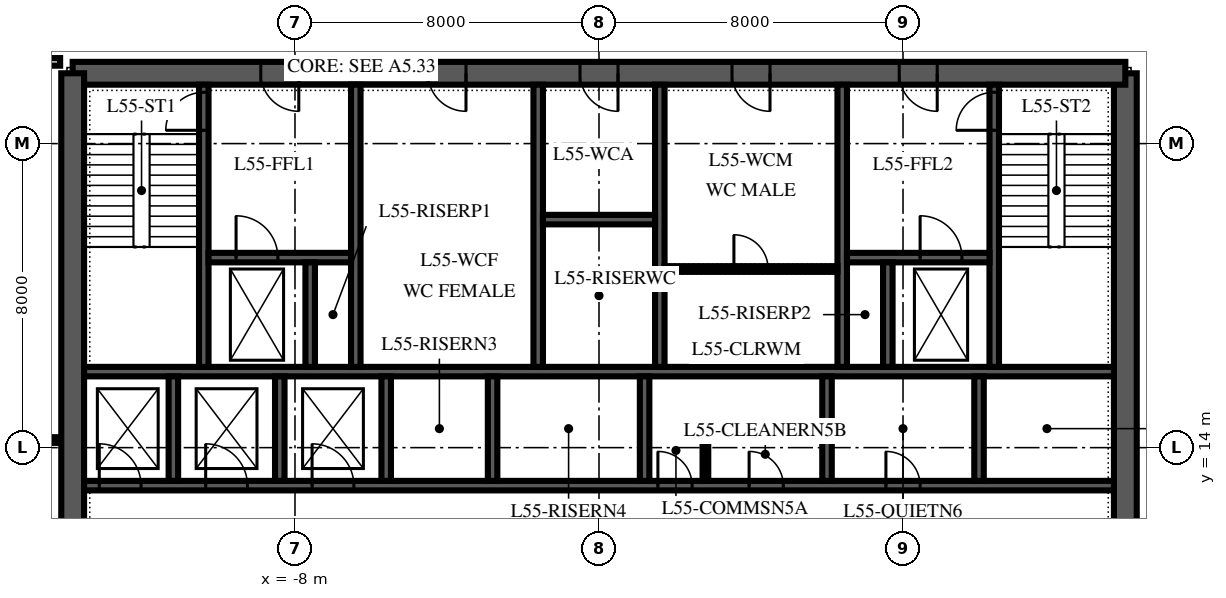
"""IFC4 building model, lengths in metres.
Left out: names, types, materials, properties, quantities, classifications, styles, units other than length and angle.
Written with IfcOpenShell. Run it as: python <this file> out.ifc"""

import sys

from ifc_helpers import new_model, si_unit, direction, frame, frame_2d, origin, place, context, subcontext, project, spatial, polyline, rectangle, outline, extrude, element, fill, save


model = new_model("IFC4")
c1 = context("Model", 3, precision=1e-05, world=origin(), true_north=direction((0.0, 1.0)))
c2 = subcontext(c1, "Body", "Model", "MODEL_VIEW")
j1 = project(units=[si_unit("LENGTHUNIT", "METRE"), si_unit("PLANEANGLEUNIT", "RADIAN")], contexts=[c1])
p1 = place(None, origin())
s1 = spatial("IfcSite", under=j1, at=p1, CompositionType="ELEMENT")
p2 = place(p1, origin())
s2 = spatial("IfcBuilding", under=s1, at=p2, CompositionType="ELEMENT")
p3 = place(p2, frame((0.0, 0.0, 238.0)))
s3 = spatial("IfcBuildingStorey", under=s2, at=p3, CompositionType="ELEMENT", Elevation=238.0)
p4 = place(p3, frame((13.85, 6.15, 0.0), z_axis=(0.0, 0.0, 1.0), x_axis=(0.0, 1.0, 0.0)))
e1 = element("IfcWall", 1, at=p4, inside=s3, PredefinedType="SHEAR", context=c2, shape_type="SweptSolid", body=[
    extrude(outline(polyline([(0.0, -0.3), (17.7, -0.3), (17.7, 0.0), (17.4, 0.0), (17.4, 0.3), (0.3, 0.3), (0.3, 0.0), (0.0, 0.0), (0.0, -0.3)])), origin(), (0.0, 0.0, 1.0), 4.0),
])
p5 = place(p4, frame((4.15, 0.0, 0.0)))
e2 = element("IfcOpeningElement", 2, at=p5, cuts=e1, PredefinedType="OPENING", context=c2, shape_type="SweptSolid", body=[
    extrude(rectangle(XDim=1.8, YDim=2.4, at=frame_2d((0.9, 1.2))), frame((0.0, 0.315, 0.0), z_axis=(0.0, -1.0, 0.0), x_axis=(1.0, 0.0, 0.0)), (0.0, 0.0, 1.0), 0.63),
])
p6 = place(p3, frame((13.85, 23.85, 0.0), z_axis=(0.0, 0.0, 1.0), x_axis=(-1.0, 0.0, 0.0)))
e3 = element("IfcWall", 3, at=p6, inside=s3, PredefinedType="SHEAR", context=c2, shape_type="SweptSolid", body=[
    extrude(rectangle(XDim=27.7, YDim=0.6, at=frame_2d((13.85, 0.0))), origin(), (0.0, 0.0, 1.0), 4.0),
])
p7 = place(p6, frame((21.75, 0.0, 0.0)))
e4 = element("IfcOpeningElement", 4, at=p7, cuts=e3, PredefinedType="OPENING", context=c2, shape_type="SweptSolid", body=[
    extrude(rectangle(XDim=1.0, YDim=2.1, at=frame_2d((0.5, 1.05))), frame((0.0, 0.315, 0.0), z_axis=(0.0, -1.0, 0.0), x_axis=(1.0, 0.0, 0.0)), (0.0, 0.0, 1.0), 0.63),
])
p8 = place(p6, frame((4.95, 0.0, 0.0)))
e5 = element("IfcOpeningElement", 5, at=p8, cuts=e3, PredefinedType="OPENING", context=c2, shape_type="SweptSolid", body=[
    extrude(rectangle(XDim=1.0, YDim=2.1, at=frame_2d((0.5, 1.05))), frame((0.0, 0.315, 0.0), z_axis=(0.0, -1.0, 0.0), x_axis=(1.0, 0.0, 0.0)), (0.0, 0.0, 1.0), 0.63),
])
p9 = place(p6, frame((17.35, 0.0, 0.0)))
e6 = element("IfcOpeningElement", 6, at=p9, cuts=e3, PredefinedType="OPENING", context=c2, shape_type="SweptSolid", body=[
    extrude(rectangle(XDim=1.0, YDim=2.1, at=frame_2d((0.5, 1.05))), frame((0.0, 0.315, 0.0), z_axis=(0.0, -1.0, 0.0), x_axis=(1.0, 0.0, 0.0)), (0.0, 0.0, 1.0), 0.63),
])
p10 = place(p6, frame((13.35, 0.0, 0.0)))
e7 = element("IfcOpeningElement", 7, at=p10, cuts=e3, PredefinedType="OPENING", context=c2, shape_type="SweptSolid", body=[
    extrude(rectangle(XDim=1.0, YDim=2.1, at=frame_2d((0.5, 1.05))), frame((0.0, 0.315, 0.0), z_axis=(0.0, -1.0, 0.0), x_axis=(1.0, 0.0, 0.0)), (0.0, 0.0, 1.0), 0.63),
])
p11 = place(p6, frame((9.35, 0.0, 0.0)))
e8 = element("IfcOpeningElement", 8, at=p11, cuts=e3, PredefinedType="OPENING", context=c2, shape_type="SweptSolid", body=[
    extrude(rectangle(XDim=1.0, YDim=2.1, at=frame_2d((0.5, 1.05))), frame((0.0, 0.315, 0.0), z_axis=(0.0, -1.0, 0.0), x_axis=(1.0, 0.0, 0.0)), (0.0, 0.0, 1.0), 0.63),
])
p12 = place(p3, frame((-13.85, 23.85, 0.0), z_axis=(0.0, 0.0, 1.0), x_axis=(0.0, -1.0, 0.0)))
e9 = element("IfcWall", 9, at=p12, inside=s3, PredefinedType="SHEAR", context=c2, shape_type="SweptSolid", body=[
    extrude(outline(polyline([(0.0, -0.3), (17.7, -0.3), (17.7, 0.0), (17.4, 0.0), (17.4, 0.3), (0.3, 0.3), (0.3, 0.0), (0.0, 0.0), (0.0, -0.3)])), origin(), (0.0, 0.0, 1.0), 4.0),
])
p13 = place(p12, frame((11.75, 0.0, 0.0)))
e10 = element("IfcOpeningElement", 10, at=p13, cuts=e9, PredefinedType="OPENING", context=c2, shape_type="SweptSolid", body=[
    extrude(rectangle(XDim=1.8, YDim=2.4, at=frame_2d((0.9, 1.2))), frame((0.0, 0.315, 0.0), z_axis=(0.0, -1.0, 0.0), x_axis=(1.0, 0.0, 0.0)), (0.0, 0.0, 1.0), 0.63),
])
p14 = place(p3, frame((-13.55, 13.0, 0.0), z_axis=(0.0, 0.0, 1.0), x_axis=(1.0, 0.0, 0.0)))
e11 = element("IfcWall", 11, at=p14, inside=s3, PredefinedType="SHEAR", context=c2, shape_type="SweptSolid", body=[
    extrude(rectangle(XDim=27.1, YDim=0.25, at=frame_2d((13.55, 0.0))), origin(), (0.0, 0.0, 1.0), 4.0),
])
p15 = place(p14, frame((0.4, 0.0, 0.0)))
e12 = element("IfcOpeningElement", 12, at=p15, cuts=e11, PredefinedType="OPENING", context=c2, shape_type="SweptSolid", body=[
    extrude(rectangle(XDim=1.1, YDim=2.1, at=frame_2d((0.55, 1.05))), frame((0.0, 0.14, 0.0), z_axis=(0.0, -1.0, 0.0), x_axis=(1.0, 0.0, 0.0)), (0.0, 0.0, 1.0), 0.28),
])
p16 = place(p14, frame((3.2, 0.0, 0.0)))
e13 = element("IfcOpeningElement", 13, at=p16, cuts=e11, PredefinedType="OPENING", context=c2, shape_type="SweptSolid", body=[
    extrude(rectangle(XDim=1.1, YDim=2.1, at=frame_2d((0.55, 1.05))), frame((0.0, 0.14, 0.0), z_axis=(0.0, -1.0, 0.0), x_axis=(1.0, 0.0, 0.0)), (0.0, 0.0, 1.0), 0.28),
])
p17 = place(p14, frame((6.0, 0.0, 0.0)))
e14 = element("IfcOpeningElement", 14, at=p17, cuts=e11, PredefinedType="OPENING", context=c2, shape_type="SweptSolid", body=[
    extrude(rectangle(XDim=1.1, YDim=2.1, at=frame_2d((0.55, 1.05))), frame((0.0, 0.14, 0.0), z_axis=(0.0, -1.0, 0.0), x_axis=(1.0, 0.0, 0.0)), (0.0, 0.0, 1.0), 0.28),
])
p18 = place(p14, frame((15.1, 0.0, 0.0)))
e15 = element("IfcOpeningElement", 15, at=p18, cuts=e11, PredefinedType="OPENING", context=c2, shape_type="SweptSolid", body=[
    extrude(rectangle(XDim=0.9, YDim=2.1, at=frame_2d((0.45, 1.05))), frame((0.0, 0.14, 0.0), z_axis=(0.0, -1.0, 0.0), x_axis=(1.0, 0.0, 0.0)), (0.0, 0.0, 1.0), 0.28),
])
p19 = place(p14, frame((17.5, 0.0, 0.0)))
e16 = element("IfcOpeningElement", 16, at=p19, cuts=e11, PredefinedType="OPENING", context=c2, shape_type="SweptSolid", body=[
    extrude(rectangle(XDim=0.9, YDim=2.1, at=frame_2d((0.45, 1.05))), frame((0.0, 0.14, 0.0), z_axis=(0.0, -1.0, 0.0), x_axis=(1.0, 0.0, 0.0)), (0.0, 0.0, 1.0), 0.28),
])
p20 = place(p14, frame((21.1, 0.0, 0.0)))
e17 = element("IfcOpeningElement", 17, at=p20, cuts=e11, PredefinedType="OPENING", context=c2, shape_type="SweptSolid", body=[
    extrude(rectangle(XDim=0.9, YDim=2.1, at=frame_2d((0.45, 1.05))), frame((0.0, 0.14, 0.0), z_axis=(0.0, -1.0, 0.0), x_axis=(1.0, 0.0, 0.0)), (0.0, 0.0, 1.0), 0.28),
])
p21 = place(p3, frame((-13.55, 16.0, 0.0), z_axis=(0.0, 0.0, 1.0), x_axis=(1.0, 0.0, 0.0)))
e18 = element("IfcWall", 18, at=p21, inside=s3, PredefinedType="SHEAR", context=c2, shape_type="SweptSolid", body=[
    extrude(rectangle(XDim=27.1, YDim=0.25, at=frame_2d((13.55, 0.0))), origin(), (0.0, 0.0, 1.0), 4.0),
])
for number, where, z_axis, x_axis in (
    (19, (-11.2, 13.125, 0.0), (0.0, 0.0, 1.0), (0.0, 1.0, 0.0)),
    (20, (-8.4, 13.125, 0.0), (0.0, 0.0, 1.0), (0.0, 1.0, 0.0)),
    (21, (-5.6, 13.125, 0.0), (0.0, 0.0, 1.0), (0.0, 1.0, 0.0)),
    (22, (-2.8, 13.125, 0.0), (0.0, 0.0, 1.0), (0.0, 1.0, 0.0)),
    (23, (1.2, 13.125, 0.0), (0.0, 0.0, 1.0), (0.0, 1.0, 0.0)),
    (24, (6.0, 13.125, 0.0), (0.0, 0.0, 1.0), (0.0, 1.0, 0.0)),
    (25, (10.0, 13.125, 0.0), (0.0, 0.0, 1.0), (0.0, 1.0, 0.0)),
):
    element("IfcWall", number, at=place(p3, frame(where, z_axis=z_axis, x_axis=x_axis)), inside=s3, PredefinedType="SHEAR", context=c2, shape_type="SweptSolid", body=[
        extrude(rectangle(XDim=2.75, YDim=0.25, at=frame_2d((1.375, 0.0))), origin(), (0.0, 0.0, 1.0), 4.0),
    ])
p22 = place(p3, frame((-10.4, 16.125, 0.0), z_axis=(0.0, 0.0, 1.0), x_axis=(0.0, 1.0, 0.0)))
e26 = element("IfcWall", 26, at=p22, inside=s3, PredefinedType="SHEAR", context=c2, shape_type="SweptSolid", body=[
    extrude(rectangle(XDim=7.425, YDim=0.25, at=frame_2d((3.712, 0.0))), origin(), (0.0, 0.0, 1.0), 4.0),
])
p23 = place(p22, frame((6.225, 0.0, 0.0)))
e27 = element("IfcOpeningElement", 27, at=p23, cuts=e26, PredefinedType="OPENING", context=c2, shape_type="SweptSolid", body=[
    extrude(rectangle(XDim=1.0, YDim=2.1, at=frame_2d((0.5, 1.05))), frame((0.0, 0.14, 0.0), z_axis=(0.0, -1.0, 0.0), x_axis=(1.0, 0.0, 0.0)), (0.0, 0.0, 1.0), 0.28),
])
for number, where, z_axis, x_axis in (
    (28, (-6.4, 16.125, 0.0), (0.0, 0.0, 1.0), (0.0, 1.0, 0.0)),
    (29, (-1.6, 16.125, 0.0), (0.0, 0.0, 1.0), (0.0, 1.0, 0.0)),
    (30, (1.6, 16.125, 0.0), (0.0, 0.0, 1.0), (0.0, 1.0, 0.0)),
    (31, (6.4, 16.125, 0.0), (0.0, 0.0, 1.0), (0.0, 1.0, 0.0)),
):
    element("IfcWall", number, at=place(p3, frame(where, z_axis=z_axis, x_axis=x_axis)), inside=s3, PredefinedType="SHEAR", context=c2, shape_type="SweptSolid", body=[
        extrude(rectangle(XDim=7.425, YDim=0.25, at=frame_2d((3.712, 0.0))), origin(), (0.0, 0.0, 1.0), 4.0),
    ])
p24 = place(p3, frame((10.4, 16.125, 0.0), z_axis=(0.0, 0.0, 1.0), x_axis=(0.0, 1.0, 0.0)))
e32 = element("IfcWall", 32, at=p24, inside=s3, PredefinedType="SHEAR", context=c2, shape_type="SweptSolid", body=[
    extrude(rectangle(XDim=7.425, YDim=0.25, at=frame_2d((3.712, 0.0))), origin(), (0.0, 0.0, 1.0), 4.0),
])
p25 = place(p24, frame((6.225, 0.0, 0.0)))
e33 = element("IfcOpeningElement", 33, at=p25, cuts=e32, PredefinedType="OPENING", context=c2, shape_type="SweptSolid", body=[
    extrude(rectangle(XDim=1.0, YDim=2.1, at=frame_2d((0.5, 1.05))), frame((0.0, 0.14, 0.0), z_axis=(0.0, -1.0, 0.0), x_axis=(1.0, 0.0, 0.0)), (0.0, 0.0, 1.0), 0.28),
])
p26 = place(p3, frame((-10.275, 19.0, 0.0), z_axis=(0.0, 0.0, 1.0), x_axis=(1.0, 0.0, 0.0)))
e34 = element("IfcWall", 34, at=p26, inside=s3, PredefinedType="SHEAR", context=c2, shape_type="SweptSolid", body=[
    extrude(rectangle(XDim=3.75, YDim=0.25, at=frame_2d((1.875, 0.0))), origin(), (0.0, 0.0, 1.0), 4.0),
])
p27 = place(p26, frame((0.725, 0.0, 0.0)))
e35 = element("IfcOpeningElement", 35, at=p27, cuts=e34, PredefinedType="OPENING", context=c2, shape_type="SweptSolid", body=[
    extrude(rectangle(XDim=1.1, YDim=2.1, at=frame_2d((0.55, 1.05))), frame((0.0, 0.14, 0.0), z_axis=(0.0, -1.0, 0.0), x_axis=(1.0, 0.0, 0.0)), (0.0, 0.0, 1.0), 0.28),
])
p28 = place(p3, frame((6.525, 19.0, 0.0), z_axis=(0.0, 0.0, 1.0), x_axis=(1.0, 0.0, 0.0)))
e36 = element("IfcWall", 36, at=p28, inside=s3, PredefinedType="SHEAR", context=c2, shape_type="SweptSolid", body=[
    extrude(rectangle(XDim=3.75, YDim=0.25, at=frame_2d((1.875, 0.0))), origin(), (0.0, 0.0, 1.0), 4.0),
])
p29 = place(p28, frame((1.925, 0.0, 0.0)))
e37 = element("IfcOpeningElement", 37, at=p29, cuts=e36, PredefinedType="OPENING", context=c2, shape_type="SweptSolid", body=[
    extrude(rectangle(XDim=1.1, YDim=2.1, at=frame_2d((0.55, 1.05))), frame((0.0, 0.14, 0.0), z_axis=(0.0, -1.0, 0.0), x_axis=(1.0, 0.0, 0.0)), (0.0, 0.0, 1.0), 0.28),
])
for number, where, z_axis, x_axis in (
    (38, (-7.6, 16.125, 0.0), (0.0, 0.0, 1.0), (0.0, 1.0, 0.0)),
    (39, (7.6, 16.125, 0.0), (0.0, 0.0, 1.0), (0.0, 1.0, 0.0)),
):
    element("IfcWall", number, at=place(p3, frame(where, z_axis=z_axis, x_axis=x_axis)), inside=s3, PredefinedType="SHEAR", context=c2, shape_type="SweptSolid", body=[
        extrude(rectangle(XDim=2.75, YDim=0.25, at=frame_2d((1.375, 0.0))), origin(), (0.0, 0.0, 1.0), 4.0),
    ])
p30 = place(p3, frame((-1.475, 20.0, 0.0), z_axis=(0.0, 0.0, 1.0), x_axis=(1.0, 0.0, 0.0)))
e40 = element("IfcWall", 40, at=p30, inside=s3, PredefinedType="SHEAR", context=c2, shape_type="SweptSolid", body=[
    extrude(rectangle(XDim=2.95, YDim=0.25, at=frame_2d((1.475, 0.0))), origin(), (0.0, 0.0, 1.0), 4.0),
])
p31 = place(p3, frame((1.725, 18.7, 0.0), z_axis=(0.0, 0.0, 1.0), x_axis=(1.0, 0.0, 0.0)))
e41 = element("IfcWall", 41, at=p31, inside=s3, PredefinedType="PARTITIONING", context=c2, shape_type="SweptSolid", body=[
    extrude(rectangle(XDim=4.55, YDim=0.15, at=frame_2d((2.275, 0.0))), origin(), (0.0, 0.0, 1.0), 3.85),
])
p32 = place(p31, frame((1.825, 0.0, 0.0)))
e42 = element("IfcOpeningElement", 42, at=p32, cuts=e41, PredefinedType="OPENING", context=c2, shape_type="SweptSolid", body=[
    extrude(rectangle(XDim=0.9, YDim=2.1, at=frame_2d((0.45, 1.05))), frame((0.0, 0.09, 0.0), z_axis=(0.0, -1.0, 0.0), x_axis=(1.0, 0.0, 0.0)), (0.0, 0.0, 1.0), 0.18),
])
p33 = place(p3, frame((2.8, 13.125, 0.0), z_axis=(0.0, 0.0, 1.0), x_axis=(0.0, 1.0, 0.0)))
e43 = element("IfcWall", 43, at=p33, inside=s3, PredefinedType="PARTITIONING", context=c2, shape_type="SweptSolid", body=[
    extrude(rectangle(XDim=1.55, YDim=0.15, at=frame_2d((0.775, 0.0))), origin(), (0.0, 0.0, 1.0), 3.85),
])
p34 = place(p3, frame((2.875, 14.6, 0.0), z_axis=(0.0, 0.0, 1.0), x_axis=(1.0, 0.0, 0.0)))
e44 = element("IfcWall", 44, at=p34, inside=s3, PredefinedType="PARTITIONING", context=c2, shape_type="SweptSolid", body=[
    extrude(rectangle(XDim=3.0, YDim=0.15, at=frame_2d((1.5, 0.0))), origin(), (0.0, 0.0, 1.0), 3.85),
])
p35 = place(p3, frame((-20.075, 14.2, 0.0), z_axis=(0.0, 0.0, 1.0), x_axis=(1.0, 0.0, 0.0)))
e45 = element("IfcWall", 45, at=p35, inside=s3, PredefinedType="PARTITIONING", context=c2, shape_type="SweptSolid", body=[
    extrude(rectangle(XDim=5.895, YDim=0.15, at=frame_2d((2.948, 0.0))), origin(), (0.0, 0.0, 1.0), 3.13),
])
p36 = place(p3, frame((-16.1, 24.15, 0.0), z_axis=(0.0, 0.0, 1.0), x_axis=(1.0, 0.0, 0.0)))
e46 = element("IfcWall", 46, at=p36, inside=s3, PredefinedType="PARTITIONING", context=c2, shape_type="SweptSolid", body=[
    extrude(rectangle(XDim=1.92, YDim=0.2, at=frame_2d((0.96, 0.0))), origin(), (0.0, 0.0, 1.0), 3.318),
])
p37 = place(p7, origin())
e47 = element("IfcDoor", 47, at=p37, inside=s3, OperationType="SINGLE_SWING_RIGHT", PredefinedType="DOOR", context=c2, shape_type="SweptSolid", body=[
    extrude(rectangle(XDim=1.0, YDim=2.1, at=frame_2d((0.5, 1.05))), frame((0.0, 0.3, 0.0), z_axis=(0.0, -1.0, 0.0), x_axis=(1.0, 0.0, 0.0)), (0.0, 0.0, 1.0), 0.6),
])
fill(e4, e47)
p38 = place(p8, origin())
e48 = element("IfcDoor", 48, at=p38, inside=s3, OperationType="SINGLE_SWING_RIGHT", PredefinedType="DOOR", context=c2, shape_type="SweptSolid", body=[
    extrude(rectangle(XDim=1.0, YDim=2.1, at=frame_2d((0.5, 1.05))), frame((0.0, 0.3, 0.0), z_axis=(0.0, -1.0, 0.0), x_axis=(1.0, 0.0, 0.0)), (0.0, 0.0, 1.0), 0.6),
])
fill(e5, e48)
p39 = place(p9, origin())
e49 = element("IfcDoor", 49, at=p39, inside=s3, OperationType="SINGLE_SWING_LEFT", PredefinedType="DOOR", context=c2, shape_type="SweptSolid", body=[
    extrude(rectangle(XDim=1.0, YDim=2.1, at=frame_2d((0.5, 1.05))), frame((0.0, 0.3, 0.0), z_axis=(0.0, -1.0, 0.0), x_axis=(1.0, 0.0, 0.0)), (0.0, 0.0, 1.0), 0.6),
])
fill(e6, e49)
p40 = place(p10, origin())
e50 = element("IfcDoor", 50, at=p40, inside=s3, OperationType="SINGLE_SWING_LEFT", PredefinedType="DOOR", context=c2, shape_type="SweptSolid", body=[
    extrude(rectangle(XDim=1.0, YDim=2.1, at=frame_2d((0.5, 1.05))), frame((0.0, 0.3, 0.0), z_axis=(0.0, -1.0, 0.0), x_axis=(1.0, 0.0, 0.0)), (0.0, 0.0, 1.0), 0.6),
])
fill(e7, e50)
p41 = place(p11, origin())
e51 = element("IfcDoor", 51, at=p41, inside=s3, OperationType="SINGLE_SWING_LEFT", PredefinedType="DOOR", context=c2, shape_type="SweptSolid", body=[
    extrude(rectangle(XDim=1.0, YDim=2.1, at=frame_2d((0.5, 1.05))), frame((0.0, 0.3, 0.0), z_axis=(0.0, -1.0, 0.0), x_axis=(1.0, 0.0, 0.0)), (0.0, 0.0, 1.0), 0.6),
])
fill(e8, e51)
p42 = place(p23, origin())
e52 = element("IfcDoor", 52, at=p42, inside=s3, OperationType="SINGLE_SWING_LEFT", PredefinedType="DOOR", context=c2, shape_type="SweptSolid", body=[
    extrude(rectangle(XDim=1.0, YDim=2.1, at=frame_2d((0.5, 1.05))), frame((0.0, 0.125, 0.0), z_axis=(0.0, -1.0, 0.0), x_axis=(1.0, 0.0, 0.0)), (0.0, 0.0, 1.0), 0.25),
])
fill(e27, e52)
p43 = place(p25, origin())
e53 = element("IfcDoor", 53, at=p43, inside=s3, OperationType="SINGLE_SWING_LEFT", PredefinedType="DOOR", context=c2, shape_type="SweptSolid", body=[
    extrude(rectangle(XDim=1.0, YDim=2.1, at=frame_2d((0.5, 1.05))), frame((0.0, 0.125, 0.0), z_axis=(0.0, -1.0, 0.0), x_axis=(1.0, 0.0, 0.0)), (0.0, 0.0, 1.0), 0.25),
])
fill(e33, e53)
p44 = place(p15, origin())
e54 = element("IfcDoor", 54, at=p44, inside=s3, OperationType="SLIDING_TO_LEFT", PredefinedType="DOOR", context=c2, shape_type="SweptSolid", body=[
    extrude(rectangle(XDim=1.1, YDim=2.1, at=frame_2d((0.55, 1.05))), frame((0.0, 0.125, 0.0), z_axis=(0.0, -1.0, 0.0), x_axis=(1.0, 0.0, 0.0)), (0.0, 0.0, 1.0), 0.25),
])
fill(e12, e54)
p45 = place(p16, origin())
e55 = element("IfcDoor", 55, at=p45, inside=s3, OperationType="SLIDING_TO_LEFT", PredefinedType="DOOR", context=c2, shape_type="SweptSolid", body=[
    extrude(rectangle(XDim=1.1, YDim=2.1, at=frame_2d((0.55, 1.05))), frame((0.0, 0.125, 0.0), z_axis=(0.0, -1.0, 0.0), x_axis=(1.0, 0.0, 0.0)), (0.0, 0.0, 1.0), 0.25),
])
fill(e13, e55)
p46 = place(p17, origin())
e56 = element("IfcDoor", 56, at=p46, inside=s3, OperationType="SLIDING_TO_LEFT", PredefinedType="DOOR", context=c2, shape_type="SweptSolid", body=[
    extrude(rectangle(XDim=1.1, YDim=2.1, at=frame_2d((0.55, 1.05))), frame((0.0, 0.125, 0.0), z_axis=(0.0, -1.0, 0.0), x_axis=(1.0, 0.0, 0.0)), (0.0, 0.0, 1.0), 0.25),
])
fill(e14, e56)
p47 = place(p29, origin())
e57 = element("IfcDoor", 57, at=p47, inside=s3, OperationType="SLIDING_TO_RIGHT", PredefinedType="DOOR", context=c2, shape_type="SweptSolid", body=[
    extrude(rectangle(XDim=1.1, YDim=2.1, at=frame_2d((0.55, 1.05))), frame((0.0, 0.125, 0.0), z_axis=(0.0, -1.0, 0.0), x_axis=(1.0, 0.0, 0.0)), (0.0, 0.0, 1.0), 0.25),
])
fill(e37, e57)
p48 = place(p27, origin())
e58 = element("IfcDoor", 58, at=p48, inside=s3, OperationType="SLIDING_TO_RIGHT", PredefinedType="DOOR", context=c2, shape_type="SweptSolid", body=[
    extrude(rectangle(XDim=1.1, YDim=2.1, at=frame_2d((0.55, 1.05))), frame((0.0, 0.125, 0.0), z_axis=(0.0, -1.0, 0.0), x_axis=(1.0, 0.0, 0.0)), (0.0, 0.0, 1.0), 0.25),
])
fill(e35, e58)
p49 = place(p18, origin())
e59 = element("IfcDoor", 59, at=p49, inside=s3, OperationType="SINGLE_SWING_LEFT", PredefinedType="DOOR", context=c2, shape_type="SweptSolid", body=[
    extrude(rectangle(XDim=0.9, YDim=2.1, at=frame_2d((0.45, 1.05))), frame((0.0, 0.125, 0.0), z_axis=(0.0, -1.0, 0.0), x_axis=(1.0, 0.0, 0.0)), (0.0, 0.0, 1.0), 0.25),
])
fill(e15, e59)
p50 = place(p19, origin())
e60 = element("IfcDoor", 60, at=p50, inside=s3, OperationType="SINGLE_SWING_LEFT", PredefinedType="DOOR", context=c2, shape_type="SweptSolid", body=[
    extrude(rectangle(XDim=0.9, YDim=2.1, at=frame_2d((0.45, 1.05))), frame((0.0, 0.125, 0.0), z_axis=(0.0, -1.0, 0.0), x_axis=(1.0, 0.0, 0.0)), (0.0, 0.0, 1.0), 0.25),
])
fill(e16, e60)
p51 = place(p20, origin())
e61 = element("IfcDoor", 61, at=p51, inside=s3, OperationType="SINGLE_SWING_LEFT", PredefinedType="DOOR", context=c2, shape_type="SweptSolid", body=[
    extrude(rectangle(XDim=0.9, YDim=2.1, at=frame_2d((0.45, 1.05))), frame((0.0, 0.125, 0.0), z_axis=(0.0, -1.0, 0.0), x_axis=(1.0, 0.0, 0.0)), (0.0, 0.0, 1.0), 0.25),
])
fill(e17, e61)
p52 = place(p32, origin())
e62 = element("IfcDoor", 62, at=p52, inside=s3, OperationType="SINGLE_SWING_LEFT", PredefinedType="DOOR", context=c2, shape_type="SweptSolid", body=[
    extrude(rectangle(XDim=0.9, YDim=2.1, at=frame_2d((0.45, 1.05))), frame((0.0, 0.075, 0.0), z_axis=(0.0, -1.0, 0.0), x_axis=(1.0, 0.0, 0.0)), (0.0, 0.0, 1.0), 0.149),
])
fill(e42, e62)
save(model, sys.argv[1])
